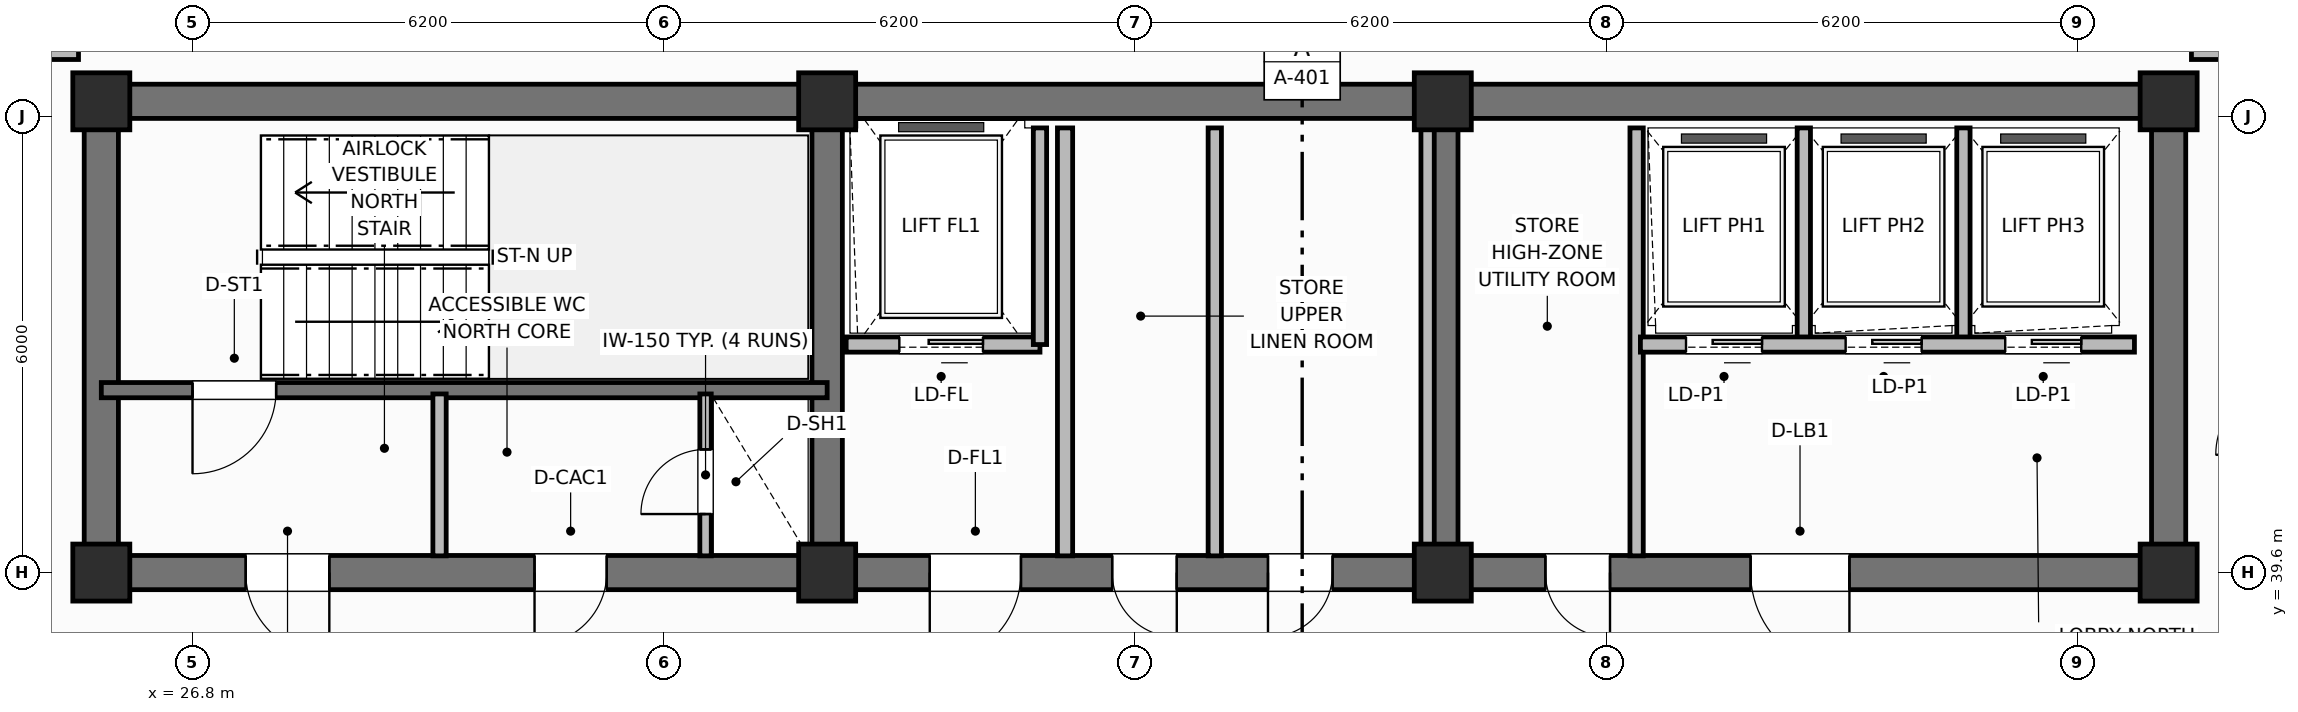
"""IFC4 building model, lengths in metres.
Left out: names, types, materials, properties, quantities, classifications, styles, units other than length and angle.
Written with IfcOpenShell. Run it as: python <this file> out.ifc"""

import sys

from ifc_helpers import new_model, si_unit, direction, frame, frame_2d, origin, origin_2d, place, context, subcontext, project, spatial, rectangle, extrude, element, fill, save


model = new_model("IFC4")
c1 = context("Model", 3, precision=1e-05, world=origin(), true_north=direction((0.0, 1.0)))
c2 = subcontext(c1, "Body", "Model", "MODEL_VIEW")
j1 = project(units=[si_unit("LENGTHUNIT", "METRE"), si_unit("PLANEANGLEUNIT", "RADIAN")], contexts=[c1])
p1 = place(None, origin())
s1 = spatial("IfcSite", under=j1, at=p1, CompositionType="ELEMENT")
p2 = place(p1, origin())
s2 = spatial("IfcBuilding", under=s1, at=p2, CompositionType="ELEMENT")
p3 = place(p2, frame((0.0, 0.0, 275.0)))
s3 = spatial("IfcBuildingStorey", under=s2, at=p3, CompositionType="ELEMENT", Elevation=275.0)
p4 = place(p3, frame((25.6, 45.8, 0.0), z_axis=(0.0, 0.0, 1.0), x_axis=(1.0, 0.0, 0.0)))
e1 = element("IfcWall", 1, at=p4, inside=s3, PredefinedType="SHEAR", context=c2, shape_type="SweptSolid", body=[
    extrude(rectangle(XDim=27.2, YDim=0.45, at=frame_2d((13.6, 0.0))), origin(), (0.0, 0.0, 1.0), 3.7),
])
for number, where, z_axis, x_axis in (
    (2, (25.6, 39.825, 0.0), (0.0, 0.0, 1.0), (0.0, 1.0, 0.0)),
    (3, (52.8, 39.825, 0.0), (0.0, 0.0, 1.0), (0.0, 1.0, 0.0)),
):
    element("IfcWall", number, at=place(p3, frame(where, z_axis=z_axis, x_axis=x_axis)), inside=s3, PredefinedType="SHEAR", context=c2, shape_type="SweptSolid", body=[
        extrude(rectangle(XDim=5.75, YDim=0.45, at=frame_2d((2.875, 0.0))), origin(), (0.0, 0.0, 1.0), 3.7),
    ])
p5 = place(p3, frame((52.8, 39.6, 0.0), z_axis=(0.0, 0.0, 1.0), x_axis=(-1.0, 0.0, 0.0)))
e4 = element("IfcWall", 4, at=p5, inside=s3, PredefinedType="SHEAR", context=c2, shape_type="SweptSolid", body=[
    extrude(rectangle(XDim=27.2, YDim=0.45, at=frame_2d((13.6, 0.0))), origin(), (0.0, 0.0, 1.0), 3.7),
])
p6 = place(p5, frame((24.2, 0.0, 0.0)))
e5 = element("IfcOpeningElement", 5, at=p6, cuts=e4, PredefinedType="OPENING", context=c2, shape_type="SweptSolid", body=[
    extrude(rectangle(XDim=1.1, YDim=2.15, at=frame_2d((0.55, 1.075))), frame((0.0, 0.235, 0.0), z_axis=(0.0, -1.0, 0.0), x_axis=(1.0, 0.0, 0.0)), (0.0, 0.0, 1.0), 0.47),
])
p7 = place(p5, frame((20.55, 0.0, 0.0)))
e6 = element("IfcOpeningElement", 6, at=p7, cuts=e4, PredefinedType="OPENING", context=c2, shape_type="SweptSolid", body=[
    extrude(rectangle(XDim=0.95, YDim=2.1, at=frame_2d((0.475, 1.05))), frame((0.0, 0.235, 0.0), z_axis=(0.0, -1.0, 0.0), x_axis=(1.0, 0.0, 0.0)), (0.0, 0.0, 1.0), 0.47),
])
p8 = place(p5, frame((15.1, 0.0, 0.0)))
e7 = element("IfcOpeningElement", 7, at=p8, cuts=e4, PredefinedType="OPENING", context=c2, shape_type="SweptSolid", body=[
    extrude(rectangle(XDim=1.2, YDim=2.15, at=frame_2d((0.6, 1.075))), frame((0.0, 0.235, 0.0), z_axis=(0.0, -1.0, 0.0), x_axis=(1.0, 0.0, 0.0)), (0.0, 0.0, 1.0), 0.47),
])
p9 = place(p5, frame((13.05, 0.0, 0.0)))
e8 = element("IfcOpeningElement", 8, at=p9, cuts=e4, PredefinedType="OPENING", context=c2, shape_type="SweptSolid", body=[
    extrude(rectangle(XDim=0.85, YDim=2.1, at=frame_2d((0.425, 1.05))), frame((0.0, 0.235, 0.0), z_axis=(0.0, -1.0, 0.0), x_axis=(1.0, 0.0, 0.0)), (0.0, 0.0, 1.0), 0.47),
])
p10 = place(p5, frame((11.0, 0.0, 0.0)))
e9 = element("IfcOpeningElement", 9, at=p10, cuts=e4, PredefinedType="OPENING", context=c2, shape_type="SweptSolid", body=[
    extrude(rectangle(XDim=0.85, YDim=2.1, at=frame_2d((0.425, 1.05))), frame((0.0, 0.235, 0.0), z_axis=(0.0, -1.0, 0.0), x_axis=(1.0, 0.0, 0.0)), (0.0, 0.0, 1.0), 0.47),
])
p11 = place(p5, frame((7.35, 0.0, 0.0)))
e10 = element("IfcOpeningElement", 10, at=p11, cuts=e4, PredefinedType="OPENING", context=c2, shape_type="SweptSolid", body=[
    extrude(rectangle(XDim=0.85, YDim=2.1, at=frame_2d((0.425, 1.05))), frame((0.0, 0.235, 0.0), z_axis=(0.0, -1.0, 0.0), x_axis=(1.0, 0.0, 0.0)), (0.0, 0.0, 1.0), 0.47),
])
p12 = place(p5, frame((4.2, 0.0, 0.0)))
e11 = element("IfcOpeningElement", 11, at=p12, cuts=e4, PredefinedType="OPENING", context=c2, shape_type="SweptSolid", body=[
    extrude(rectangle(XDim=1.3, YDim=2.2, at=frame_2d((0.65, 1.1))), frame((0.0, 0.235, 0.0), z_axis=(0.0, -1.0, 0.0), x_axis=(1.0, 0.0, 0.0)), (0.0, 0.0, 1.0), 0.47),
])
for number, where, z_axis, x_axis in (
    (12, (35.15, 39.825, 0.0), (0.0, 0.0, 1.0), (0.0, 1.0, 0.0)),
    (13, (43.25, 39.825, 0.0), (0.0, 0.0, 1.0), (0.0, 1.0, 0.0)),
):
    element("IfcWall", number, at=place(p3, frame(where, z_axis=z_axis, x_axis=x_axis)), inside=s3, PredefinedType="SHEAR", context=c2, shape_type="SweptSolid", body=[
        extrude(rectangle(XDim=5.75, YDim=0.4, at=frame_2d((2.875, 0.0))), origin(), (0.0, 0.0, 1.0), 3.7),
    ])
for number, where, z_axis, x_axis in (
    (14, (25.6, 39.6, 0.0), (0.0, 0.0, 1.0), (1.0, 0.0, 0.0)),
    (15, (25.6, 45.8, 0.0), (0.0, 0.0, 1.0), (1.0, 0.0, 0.0)),
    (16, (35.15, 39.6, 0.0), (0.0, 0.0, 1.0), (1.0, 0.0, 0.0)),
    (17, (35.15, 45.8, 0.0), (0.0, 0.0, 1.0), (1.0, 0.0, 0.0)),
    (18, (43.25, 39.6, 0.0), (0.0, 0.0, 1.0), (1.0, 0.0, 0.0)),
    (19, (43.25, 45.8, 0.0), (0.0, 0.0, 1.0), (1.0, 0.0, 0.0)),
    (20, (52.8, 39.6, 0.0), (0.0, 0.0, 1.0), (1.0, 0.0, 0.0)),
    (21, (52.8, 45.8, 0.0), (0.0, 0.0, 1.0), (1.0, 0.0, 0.0)),
):
    element("IfcColumn", number, at=place(p3, frame(where, z_axis=z_axis, x_axis=x_axis)), inside=s3, PredefinedType="COLUMN", context=c2, shape_type="SweptSolid", body=[
        extrude(rectangle(XDim=0.75, YDim=0.75, at=origin_2d()), origin(), (0.0, 0.0, 1.0), 3.7),
    ])
p13 = place(p3, frame((35.15, 42.0, 0.0), z_axis=(0.0, 0.0, 1.0), x_axis=(-1.0, 0.0, 0.0)))
e22 = element("IfcWall", 22, at=p13, inside=s3, PredefinedType="SHEAR", context=c2, shape_type="SweptSolid", body=[
    extrude(rectangle(XDim=9.55, YDim=0.2, at=frame_2d((4.775, 0.0))), origin(), (0.0, 0.0, 1.0), 3.7),
])
p14 = place(p13, frame((7.25, 0.0, 0.0)))
e23 = element("IfcOpeningElement", 23, at=p14, cuts=e22, PredefinedType="OPENING", context=c2, shape_type="SweptSolid", body=[
    extrude(rectangle(XDim=1.1, YDim=2.15, at=frame_2d((0.55, 1.075))), frame((0.0, 0.11, 0.0), z_axis=(0.0, -1.0, 0.0), x_axis=(1.0, 0.0, 0.0)), (0.0, 0.0, 1.0), 0.22),
])
p15 = place(p3, frame((33.55, 39.82, 0.0), z_axis=(0.0, 0.0, 1.0), x_axis=(0.0, 1.0, 0.0)))
e24 = element("IfcWall", 24, at=p15, inside=s3, PredefinedType="PARTITIONING", context=c2, shape_type="SweptSolid", body=[
    extrude(rectangle(XDim=2.13, YDim=0.15, at=frame_2d((1.065, 0.0))), origin(), (0.0, 0.0, 1.0), 2.56),
])
p16 = place(p15, frame((0.55, 0.0, 0.0)))
e25 = element("IfcOpeningElement", 25, at=p16, cuts=e24, PredefinedType="OPENING", context=c2, shape_type="SweptSolid", body=[
    extrude(rectangle(XDim=0.85, YDim=2.05, at=frame_2d((0.425, 1.025))), frame((0.0, 0.085, 0.0), z_axis=(0.0, -1.0, 0.0), x_axis=(1.0, 0.0, 0.0)), (0.0, 0.0, 1.0), 0.17),
])
p17 = place(p3, frame((30.05, 39.82, 0.0), z_axis=(0.0, 0.0, 1.0), x_axis=(0.0, 1.0, 0.0)))
e26 = element("IfcWall", 26, at=p17, inside=s3, PredefinedType="PARTITIONING", context=c2, shape_type="SweptSolid", body=[
    extrude(rectangle(XDim=2.13, YDim=0.175, at=frame_2d((1.065, 0.0))), origin(), (0.0, 0.0, 1.0), 2.56),
])
p18 = place(p3, frame((37.95, 42.6, 0.0), z_axis=(0.0, 0.0, 1.0), x_axis=(-1.0, 0.0, 0.0)))
e27 = element("IfcWall", 27, at=p18, inside=s3, PredefinedType="PARTITIONING", context=c2, shape_type="SweptSolid", body=[
    extrude(rectangle(XDim=2.55, YDim=0.2, at=frame_2d((1.275, 0.0))), origin(), (0.0, 0.0, 1.0), 2.33),
])
p19 = place(p18, frame((0.75, 0.0, 0.0)))
e28 = element("IfcOpeningElement", 28, at=p19, cuts=e27, PredefinedType="OPENING", context=c2, shape_type="SweptSolid", body=[
    extrude(rectangle(XDim=1.1, YDim=2.15, at=frame_2d((0.55, 1.075))), frame((0.0, 0.11, 0.0), z_axis=(0.0, -1.0, 0.0), x_axis=(1.0, 0.0, 0.0)), (0.0, 0.0, 1.0), 0.22),
])
p20 = place(p3, frame((37.95, 42.6, 0.0), z_axis=(0.0, 0.0, 1.0), x_axis=(0.0, 1.0, 0.0)))
e29 = element("IfcWall", 29, at=p20, inside=s3, PredefinedType="PARTITIONING", context=c2, shape_type="SweptSolid", body=[
    extrude(rectangle(XDim=2.85, YDim=0.175, at=frame_2d((1.425, 0.0))), origin(), (0.0, 0.0, 1.0), 2.56),
])
p21 = place(p3, frame((38.28, 39.82, 0.0), z_axis=(0.0, 0.0, 1.0), x_axis=(0.0, 1.0, 0.0)))
e30 = element("IfcWall", 30, at=p21, inside=s3, PredefinedType="PARTITIONING", context=c2, shape_type="SweptSolid", body=[
    extrude(rectangle(XDim=5.63, YDim=0.2, at=frame_2d((2.815, 0.0))), origin(), (0.0, 0.0, 1.0), 2.56),
])
for number, where, z_axis, x_axis in (
    (31, (43.05, 39.82, 0.0), (0.0, 0.0, 1.0), (0.0, 1.0, 0.0)),
    (32, (40.25, 39.82, 0.0), (0.0, 0.0, 1.0), (0.0, 1.0, 0.0)),
    (33, (45.8, 39.82, 0.0), (0.0, 0.0, 1.0), (0.0, 1.0, 0.0)),
):
    element("IfcWall", number, at=place(p3, frame(where, z_axis=z_axis, x_axis=x_axis)), inside=s3, PredefinedType="PARTITIONING", context=c2, shape_type="SweptSolid", body=[
        extrude(rectangle(XDim=5.63, YDim=0.175, at=frame_2d((2.815, 0.0))), origin(), (0.0, 0.0, 1.0), 2.56),
    ])
for number, where, z_axis, x_axis in (
    (34, (48.0, 42.65, 0.0), (0.0, 0.0, 1.0), (0.0, 1.0, 0.0)),
    (35, (50.1, 42.65, 0.0), (0.0, 0.0, 1.0), (0.0, 1.0, 0.0)),
):
    element("IfcWall", number, at=place(p3, frame(where, z_axis=z_axis, x_axis=x_axis)), inside=s3, PredefinedType="PARTITIONING", context=c2, shape_type="SweptSolid", body=[
        extrude(rectangle(XDim=2.8, YDim=0.175, at=frame_2d((1.4, 0.0))), origin(), (0.0, 0.0, 1.0), 2.56),
    ])
p22 = place(p3, frame((52.35, 42.6, 0.0), z_axis=(0.0, 0.0, 1.0), x_axis=(-1.0, 0.0, 0.0)))
e36 = element("IfcWall", 36, at=p22, inside=s3, PredefinedType="PARTITIONING", context=c2, shape_type="SweptSolid", body=[
    extrude(rectangle(XDim=6.5, YDim=0.2, at=frame_2d((3.25, 0.0))), origin(), (0.0, 0.0, 1.0), 2.56),
])
p23 = place(p22, frame((4.9, 0.0, 0.0)))
e37 = element("IfcOpeningElement", 37, at=p23, cuts=e36, PredefinedType="OPENING", context=c2, shape_type="SweptSolid", body=[
    extrude(rectangle(XDim=1.0, YDim=2.15, at=frame_2d((0.5, 1.075))), frame((0.0, 0.11, 0.0), z_axis=(0.0, -1.0, 0.0), x_axis=(1.0, 0.0, 0.0)), (0.0, 0.0, 1.0), 0.22),
])
p24 = place(p22, frame((2.8, 0.0, 0.0)))
e38 = element("IfcOpeningElement", 38, at=p24, cuts=e36, PredefinedType="OPENING", context=c2, shape_type="SweptSolid", body=[
    extrude(rectangle(XDim=1.0, YDim=2.15, at=frame_2d((0.5, 1.075))), frame((0.0, 0.11, 0.0), z_axis=(0.0, -1.0, 0.0), x_axis=(1.0, 0.0, 0.0)), (0.0, 0.0, 1.0), 0.22),
])
p25 = place(p22, frame((0.7, 0.0, 0.0)))
e39 = element("IfcOpeningElement", 39, at=p25, cuts=e36, PredefinedType="OPENING", context=c2, shape_type="SweptSolid", body=[
    extrude(rectangle(XDim=1.0, YDim=2.15, at=frame_2d((0.5, 1.075))), frame((0.0, 0.11, 0.0), z_axis=(0.0, -1.0, 0.0), x_axis=(1.0, 0.0, 0.0)), (0.0, 0.0, 1.0), 0.22),
])
p26 = place(p3, frame((21.546, 46.45, 0.0), z_axis=(0.0, 0.0, 1.0), x_axis=(1.0, 0.0, 0.0)))
e40 = element("IfcWall", 40, at=p26, inside=s3, PredefinedType="PARTITIONING", context=c2, shape_type="SweptSolid", body=[
    extrude(rectangle(XDim=3.754, YDim=0.2, at=frame_2d((1.877, 0.0))), origin(), (0.0, 0.0, 1.0), 2.56),
])
p27 = place(p3, frame((53.1, 46.45, 0.0), z_axis=(0.0, 0.0, 1.0), x_axis=(1.0, 0.0, 0.0)))
e41 = element("IfcWall", 41, at=p27, inside=s3, PredefinedType="PARTITIONING", context=c2, shape_type="SweptSolid", body=[
    extrude(rectangle(XDim=3.754, YDim=0.2, at=frame_2d((1.877, 0.0))), origin(), (0.0, 0.0, 1.0), 2.56),
])
p28 = place(p14, origin())
e42 = element("IfcDoor", 42, at=p28, inside=s3, OperationType="SINGLE_SWING_RIGHT", PredefinedType="DOOR", context=c2, shape_type="SweptSolid", body=[
    extrude(rectangle(XDim=1.1, YDim=2.15, at=frame_2d((0.55, 1.075))), frame((0.0, 0.025, 0.0), z_axis=(0.0, -1.0, 0.0), x_axis=(1.0, 0.0, 0.0)), (0.0, 0.0, 1.0), 0.05),
])
fill(e23, e42)
p29 = place(p16, origin())
e43 = element("IfcDoor", 43, at=p29, inside=s3, OperationType="SINGLE_SWING_LEFT", PredefinedType="TRAPDOOR", context=c2, shape_type="SweptSolid", body=[
    extrude(rectangle(XDim=0.85, YDim=2.05, at=frame_2d((0.425, 1.025))), frame((0.0, 0.025, 0.0), z_axis=(0.0, -1.0, 0.0), x_axis=(1.0, 0.0, 0.0)), (0.0, 0.0, 1.0), 0.05),
])
fill(e25, e43)
p30 = place(p19, origin())
e44 = element("IfcDoor", 44, at=p30, inside=s3, OperationType="SLIDING_TO_LEFT", PredefinedType="DOOR", context=c2, shape_type="SweptSolid", body=[
    extrude(rectangle(XDim=1.1, YDim=2.15, at=frame_2d((0.55, 1.075))), frame((0.0, 0.025, 0.0), z_axis=(0.0, -1.0, 0.0), x_axis=(1.0, 0.0, 0.0)), (0.0, 0.0, 1.0), 0.05),
])
fill(e28, e44)
p31 = place(p23, origin())
e45 = element("IfcDoor", 45, at=p31, inside=s3, OperationType="SLIDING_TO_LEFT", PredefinedType="DOOR", context=c2, shape_type="SweptSolid", body=[
    extrude(rectangle(XDim=1.0, YDim=2.15, at=frame_2d((0.5, 1.075))), frame((0.0, 0.025, 0.0), z_axis=(0.0, -1.0, 0.0), x_axis=(1.0, 0.0, 0.0)), (0.0, 0.0, 1.0), 0.05),
])
fill(e37, e45)
p32 = place(p24, origin())
e46 = element("IfcDoor", 46, at=p32, inside=s3, OperationType="SLIDING_TO_LEFT", PredefinedType="DOOR", context=c2, shape_type="SweptSolid", body=[
    extrude(rectangle(XDim=1.0, YDim=2.15, at=frame_2d((0.5, 1.075))), frame((0.0, 0.025, 0.0), z_axis=(0.0, -1.0, 0.0), x_axis=(1.0, 0.0, 0.0)), (0.0, 0.0, 1.0), 0.05),
])
fill(e38, e46)
p33 = place(p25, origin())
e47 = element("IfcDoor", 47, at=p33, inside=s3, OperationType="SLIDING_TO_LEFT", PredefinedType="DOOR", context=c2, shape_type="SweptSolid", body=[
    extrude(rectangle(XDim=1.0, YDim=2.15, at=frame_2d((0.5, 1.075))), frame((0.0, 0.025, 0.0), z_axis=(0.0, -1.0, 0.0), x_axis=(1.0, 0.0, 0.0)), (0.0, 0.0, 1.0), 0.05),
])
fill(e39, e47)
p34 = place(p6, origin())
e48 = element("IfcDoor", 48, at=p34, inside=s3, OperationType="SINGLE_SWING_LEFT", PredefinedType="DOOR", context=c2, shape_type="SweptSolid", body=[
    extrude(rectangle(XDim=1.1, YDim=2.15, at=frame_2d((0.55, 1.075))), frame((0.0, 0.025, 0.0), z_axis=(0.0, -1.0, 0.0), x_axis=(1.0, 0.0, 0.0)), (0.0, 0.0, 1.0), 0.05),
])
fill(e5, e48)
p35 = place(p7, origin())
e49 = element("IfcDoor", 49, at=p35, inside=s3, OperationType="SINGLE_SWING_RIGHT", PredefinedType="DOOR", context=c2, shape_type="SweptSolid", body=[
    extrude(rectangle(XDim=0.95, YDim=2.1, at=frame_2d((0.475, 1.05))), frame((0.0, 0.025, 0.0), z_axis=(0.0, -1.0, 0.0), x_axis=(1.0, 0.0, 0.0)), (0.0, 0.0, 1.0), 0.05),
])
fill(e6, e49)
p36 = place(p8, origin())
e50 = element("IfcDoor", 50, at=p36, inside=s3, OperationType="SINGLE_SWING_RIGHT", PredefinedType="DOOR", context=c2, shape_type="SweptSolid", body=[
    extrude(rectangle(XDim=1.2, YDim=2.15, at=frame_2d((0.6, 1.075))), frame((0.0, 0.025, 0.0), z_axis=(0.0, -1.0, 0.0), x_axis=(1.0, 0.0, 0.0)), (0.0, 0.0, 1.0), 0.05),
])
fill(e7, e50)
p37 = place(p9, origin())
e51 = element("IfcDoor", 51, at=p37, inside=s3, OperationType="SINGLE_SWING_LEFT", PredefinedType="DOOR", context=c2, shape_type="SweptSolid", body=[
    extrude(rectangle(XDim=0.85, YDim=2.1, at=frame_2d((0.425, 1.05))), frame((0.0, 0.025, 0.0), z_axis=(0.0, -1.0, 0.0), x_axis=(1.0, 0.0, 0.0)), (0.0, 0.0, 1.0), 0.05),
])
fill(e8, e51)
p38 = place(p10, origin())
e52 = element("IfcDoor", 52, at=p38, inside=s3, OperationType="SINGLE_SWING_RIGHT", PredefinedType="DOOR", context=c2, shape_type="SweptSolid", body=[
    extrude(rectangle(XDim=0.85, YDim=2.1, at=frame_2d((0.425, 1.05))), frame((0.0, 0.025, 0.0), z_axis=(0.0, -1.0, 0.0), x_axis=(1.0, 0.0, 0.0)), (0.0, 0.0, 1.0), 0.05),
])
fill(e9, e52)
p39 = place(p11, origin())
e53 = element("IfcDoor", 53, at=p39, inside=s3, OperationType="SINGLE_SWING_LEFT", PredefinedType="DOOR", context=c2, shape_type="SweptSolid", body=[
    extrude(rectangle(XDim=0.85, YDim=2.1, at=frame_2d((0.425, 1.05))), frame((0.0, 0.025, 0.0), z_axis=(0.0, -1.0, 0.0), x_axis=(1.0, 0.0, 0.0)), (0.0, 0.0, 1.0), 0.05),
])
fill(e10, e53)
p40 = place(p12, origin())
e54 = element("IfcDoor", 54, at=p40, inside=s3, OperationType="SINGLE_SWING_LEFT", PredefinedType="DOOR", context=c2, shape_type="SweptSolid", body=[
    extrude(rectangle(XDim=1.3, YDim=2.2, at=frame_2d((0.65, 1.1))), frame((0.0, 0.025, 0.0), z_axis=(0.0, -1.0, 0.0), x_axis=(1.0, 0.0, 0.0)), (0.0, 0.0, 1.0), 0.05),
])
fill(e11, e54)
save(model, sys.argv[1])
